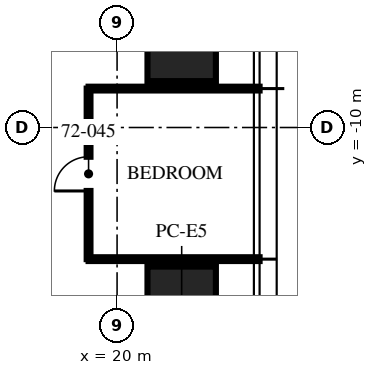
"""IFC4 building model, lengths in metres.
Left out: names, types, materials, properties, quantities, classifications, styles, units other than length and angle.
Written with IfcOpenShell. Run it as: python <this file> out.ifc"""

import sys

from ifc_helpers import new_model, si_unit, direction, frame, frame_2d, origin, origin_2d, place, context, subcontext, project, spatial, rectangle, extrude, element, fill, save


model = new_model("IFC4")
c1 = context("Model", 3, precision=1e-05, world=origin(), true_north=direction((0.0, 1.0)))
c2 = subcontext(c1, "Body", "Model", "MODEL_VIEW")
j1 = project(units=[si_unit("LENGTHUNIT", "METRE"), si_unit("PLANEANGLEUNIT", "RADIAN")], contexts=[c1])
p1 = place(None, origin())
s1 = spatial("IfcSite", under=j1, at=p1, CompositionType="ELEMENT")
p2 = place(p1, origin())
s2 = spatial("IfcBuilding", under=s1, at=p2, CompositionType="ELEMENT")
p3 = place(p2, frame((0.0, 0.0, 289.5)))
s3 = spatial("IfcBuildingStorey", under=s2, at=p3, CompositionType="ELEMENT", Elevation=289.5)
for number, where, z_axis, x_axis in (
    (1, (21.7, -7.48, 0.0), (0.0, 0.0, 1.0), (0.0, 1.0, 0.0)),
    (2, (21.7, -14.96, 0.0), (0.0, 0.0, 1.0), (0.0, 1.0, 0.0)),
):
    element("IfcColumn", number, at=place(p3, frame(where, z_axis=z_axis, x_axis=x_axis)), inside=s3, PredefinedType="COLUMN", context=c2, shape_type="SweptSolid", body=[
        extrude(rectangle(XDim=2.6, YDim=1.8, at=origin_2d()), origin(), (0.0, 0.0, 1.0), 3.75),
    ])
for number, where, z_axis, x_axis in (
    (3, (19.25, -13.464, 0.0), (0.0, 0.0, 1.0), (1.0, 0.0, 0.0)),
    (4, (19.25, -8.976, 0.0), (0.0, 0.0, 1.0), (1.0, 0.0, 0.0)),
):
    element("IfcWall", number, at=place(p3, frame(where, z_axis=z_axis, x_axis=x_axis)), inside=s3, PredefinedType="PARTITIONING", context=c2, shape_type="SweptSolid", body=[
        extrude(rectangle(XDim=4.5, YDim=0.1, at=frame_2d((2.25, 0.0))), origin(), (0.0, 0.0, 1.0), 3.01),
    ])
p4 = place(p3, frame((19.25, -13.464, 0.0), z_axis=(0.0, 0.0, 1.0), x_axis=(0.0, 1.0, 0.0)))
e5 = element("IfcWall", 5, at=p4, inside=s3, PredefinedType="PARTITIONING", context=c2, shape_type="SweptSolid", body=[
    extrude(rectangle(XDim=4.488, YDim=0.1, at=frame_2d((2.244, 0.0))), origin(), (0.0, 0.0, 1.0), 2.91),
])
p5 = place(p4, frame((1.794, 0.0, 0.0)))
e6 = element("IfcOpeningElement", 6, at=p5, cuts=e5, PredefinedType="OPENING", context=c2, shape_type="SweptSolid", body=[
    extrude(rectangle(XDim=0.9, YDim=2.1, at=frame_2d((0.45, 1.05))), frame((0.0, 0.06, 0.0), z_axis=(0.0, -1.0, 0.0), x_axis=(1.0, 0.0, 0.0)), (0.0, 0.0, 1.0), 0.12),
])
p6 = place(p5, origin())
e7 = element("IfcDoor", 7, at=p6, inside=s3, OperationType="SINGLE_SWING_LEFT", PredefinedType="DOOR", context=c2, shape_type="SweptSolid", body=[
    extrude(rectangle(XDim=0.9, YDim=2.1, at=frame_2d((0.45, 1.05))), frame((0.0, 0.025, 0.0), z_axis=(0.0, -1.0, 0.0), x_axis=(1.0, 0.0, 0.0)), (0.0, 0.0, 1.0), 0.05),
])
fill(e6, e7)
save(model, sys.argv[1])
